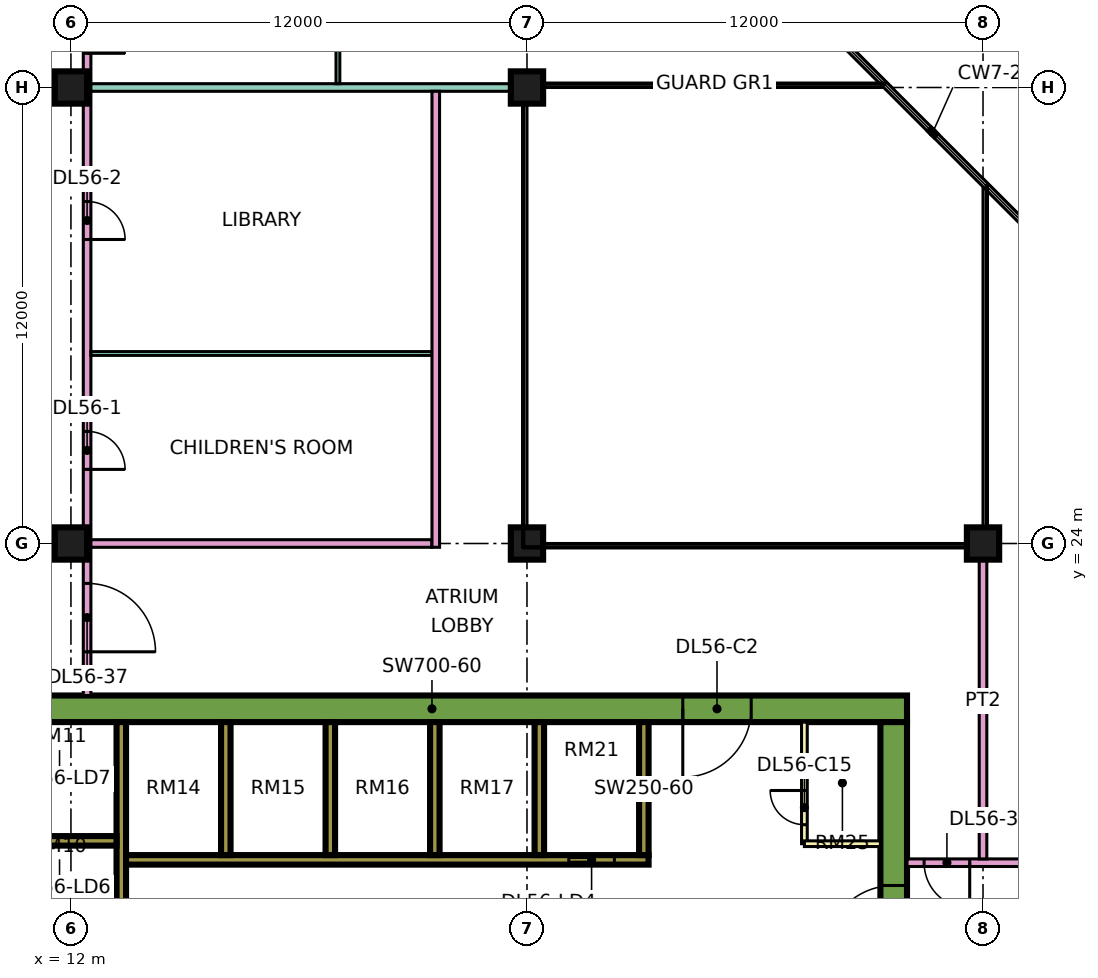
"""IFC4 building model, lengths in metres.
Left out: names, types, materials, properties, quantities, classifications, styles, units other than length and angle.
Written with IfcOpenShell. Run it as: python <this file> out.ifc"""

import sys

from ifc_helpers import new_model, si_unit, direction, frame, frame_2d, origin, origin_2d, place, context, subcontext, project, spatial, rectangle, extrude, element, fill, save


model = new_model("IFC4")
c1 = context("Model", 3, precision=1e-05, world=origin(), true_north=direction((0.0, 1.0)))
c2 = subcontext(c1, "Body", "Model", "MODEL_VIEW")
j1 = project(units=[si_unit("LENGTHUNIT", "METRE"), si_unit("PLANEANGLEUNIT", "RADIAN")], contexts=[c1])
p1 = place(None, origin())
s1 = spatial("IfcSite", under=j1, at=p1, CompositionType="ELEMENT")
p2 = place(p1, origin())
s2 = spatial("IfcBuilding", under=s1, at=p2, CompositionType="ELEMENT")
p3 = place(p2, frame((0.0, 0.0, 237.9)))
s3 = spatial("IfcBuildingStorey", under=s2, at=p3, CompositionType="ELEMENT", Elevation=237.9)
for number, where, z_axis, x_axis in (
    (1, (12.0, 24.0, 0.0), (0.0, 0.0, 1.0), (1.0, 0.0, 0.0)),
    (2, (12.0, 36.0, 0.0), (0.0, 0.0, 1.0), (1.0, 0.0, 0.0)),
    (3, (24.0, 24.0, 0.0), (0.0, 0.0, 1.0), (1.0, 0.0, 0.0)),
    (4, (24.0, 36.0, 0.0), (0.0, 0.0, 1.0), (1.0, 0.0, 0.0)),
    (5, (36.0, 24.0, 0.0), (0.0, 0.0, 1.0), (1.0, 0.0, 0.0)),
):
    element("IfcColumn", number, at=place(p3, frame(where, z_axis=z_axis, x_axis=x_axis)), inside=s3, PredefinedType="COLUMN", context=c2, shape_type="SweptSolid", body=[
        extrude(rectangle(XDim=0.85, YDim=0.85, at=origin_2d()), origin(), (0.0, 0.0, 1.0), 3.75),
    ])
p4 = place(p3, frame((9.0, 19.65, 0.0), z_axis=(0.0, 0.0, 1.0), x_axis=(1.0, 0.0, 0.0)))
e6 = element("IfcWall", 6, at=p4, inside=s3, PredefinedType="SHEAR", context=c2, shape_type="SweptSolid", body=[
    extrude(rectangle(XDim=25.0, YDim=0.7, at=frame_2d((12.5, 0.0))), origin(), (0.0, 0.0, 1.0), 3.75),
])
p5 = place(p4, frame((19.1, 0.0, 0.0)))
e7 = element("IfcOpeningElement", 7, at=p5, cuts=e6, PredefinedType="OPENING", context=c2, shape_type="SweptSolid", body=[
    extrude(rectangle(XDim=1.8, YDim=2.4, at=frame_2d((0.9, 1.2))), frame((0.0, 0.36, 0.0), z_axis=(0.0, -1.0, 0.0), x_axis=(1.0, 0.0, 0.0)), (0.0, 0.0, 1.0), 0.72),
])
p6 = place(p3, frame((33.65, 7.7, 0.0), z_axis=(0.0, 0.0, 1.0), x_axis=(0.0, 1.0, 0.0)))
e8 = element("IfcWall", 8, at=p6, inside=s3, PredefinedType="SHEAR", context=c2, shape_type="SweptSolid", body=[
    extrude(rectangle(XDim=11.6, YDim=0.7, at=frame_2d((5.8, 0.0))), origin(), (0.0, 0.0, 1.0), 3.75),
])
p7 = place(p6, frame((5.5, 0.0, 0.0)))
e9 = element("IfcOpeningElement", 9, at=p7, cuts=e8, PredefinedType="OPENING", context=c2, shape_type="SweptSolid", body=[
    extrude(rectangle(XDim=1.8, YDim=2.4, at=frame_2d((0.9, 1.2))), frame((0.0, 0.36, 0.0), z_axis=(0.0, -1.0, 0.0), x_axis=(1.0, 0.0, 0.0)), (0.0, 0.0, 1.0), 0.72),
])
p8 = place(p3, frame((13.325, 7.7, 0.0), z_axis=(0.0, 0.0, 1.0), x_axis=(0.0, 1.0, 0.0)))
e10 = element("IfcWall", 10, at=p8, inside=s3, PredefinedType="SHEAR", context=c2, shape_type="SweptSolid", body=[
    extrude(rectangle(XDim=11.6, YDim=0.25, at=frame_2d((5.8, 0.0))), origin(), (0.0, 0.0, 1.0), 3.75),
])
p9 = place(p3, frame((13.45, 15.675, 0.0), z_axis=(0.0, 0.0, 1.0), x_axis=(1.0, 0.0, 0.0)))
e11 = element("IfcWall", 11, at=p9, inside=s3, PredefinedType="SHEAR", context=c2, shape_type="SweptSolid", body=[
    extrude(rectangle(XDim=13.75, YDim=0.25, at=frame_2d((6.875, 0.0))), origin(), (0.0, 0.0, 1.0), 3.75),
])
p10 = place(p9, frame((11.65, 0.0, 0.0)))
e12 = element("IfcOpeningElement", 12, at=p10, cuts=e11, PredefinedType="OPENING", context=c2, shape_type="SweptSolid", body=[
    extrude(rectangle(XDim=1.2, YDim=2.2, at=frame_2d((0.6, 1.1))), frame((0.0, 0.135, 0.0), z_axis=(0.0, -1.0, 0.0), x_axis=(1.0, 0.0, 0.0)), (0.0, 0.0, 1.0), 0.27),
])
p11 = place(p3, frame((10.2, 16.175, 0.0), z_axis=(0.0, 0.0, 1.0), x_axis=(1.0, 0.0, 0.0)))
e13 = element("IfcWall", 13, at=p11, inside=s3, PredefinedType="SHEAR", context=c2, shape_type="SweptSolid", body=[
    extrude(rectangle(XDim=3.0, YDim=0.25, at=frame_2d((1.5, 0.0))), origin(), (0.0, 0.0, 1.0), 3.75),
])
for number, where, z_axis, x_axis in (
    (14, (16.075, 15.8, 0.0), (0.0, 0.0, 1.0), (0.0, 1.0, 0.0)),
    (15, (18.825, 15.8, 0.0), (0.0, 0.0, 1.0), (0.0, 1.0, 0.0)),
    (16, (21.575, 15.8, 0.0), (0.0, 0.0, 1.0), (0.0, 1.0, 0.0)),
    (17, (24.325, 15.8, 0.0), (0.0, 0.0, 1.0), (0.0, 1.0, 0.0)),
    (18, (27.075, 15.8, 0.0), (0.0, 0.0, 1.0), (0.0, 1.0, 0.0)),
):
    element("IfcWall", number, at=place(p3, frame(where, z_axis=z_axis, x_axis=x_axis)), inside=s3, PredefinedType="SHEAR", context=c2, shape_type="SweptSolid", body=[
        extrude(rectangle(XDim=3.5, YDim=0.25, at=frame_2d((1.75, 0.0))), origin(), (0.0, 0.0, 1.0), 3.75),
    ])
p12 = place(p3, frame((31.3, 16.1, 0.0), z_axis=(0.0, 0.0, 1.0), x_axis=(0.0, 1.0, 0.0)))
e19 = element("IfcWall", 19, at=p12, inside=s3, PredefinedType="PARTITIONING", context=c2, shape_type="SweptSolid", body=[
    extrude(rectangle(XDim=3.2, YDim=0.15, at=frame_2d((1.6, 0.0))), origin(), (0.0, 0.0, 1.0), 3.35),
])
p13 = place(p12, frame((0.5, 0.0, 0.0)))
e20 = element("IfcOpeningElement", 20, at=p13, cuts=e19, PredefinedType="OPENING", context=c2, shape_type="SweptSolid", body=[
    extrude(rectangle(XDim=0.9, YDim=2.1, at=frame_2d((0.45, 1.05))), frame((0.0, 0.085, 0.0), z_axis=(0.0, -1.0, 0.0), x_axis=(1.0, 0.0, 0.0)), (0.0, 0.0, 1.0), 0.17),
])
p14 = place(p3, frame((31.3, 16.1, 0.0), z_axis=(0.0, 0.0, 1.0), x_axis=(1.0, 0.0, 0.0)))
e21 = element("IfcWall", 21, at=p14, inside=s3, PredefinedType="PARTITIONING", context=c2, shape_type="SweptSolid", body=[
    extrude(rectangle(XDim=2.0, YDim=0.15, at=frame_2d((1.0, 0.0))), origin(), (0.0, 0.0, 1.0), 3.35),
])
p15 = place(p3, frame((12.425, 20.0, 0.0), z_axis=(0.0, 0.0, 1.0), x_axis=(0.0, 1.0, 0.0)))
e22 = element("IfcWall", 22, at=p15, inside=s3, PredefinedType="PARTITIONING", context=c2, shape_type="SweptSolid", body=[
    extrude(rectangle(XDim=43.0, YDim=0.2, at=frame_2d((21.5, 0.0))), origin(), (0.0, 0.0, 1.0), 3.35),
])
p16 = place(p15, frame((5.95, 0.0, 0.0)))
e23 = element("IfcOpeningElement", 23, at=p16, cuts=e22, PredefinedType="OPENING", context=c2, shape_type="SweptSolid", body=[
    extrude(rectangle(XDim=1.0, YDim=2.1, at=frame_2d((0.5, 1.05))), frame((0.0, 0.11, 0.0), z_axis=(0.0, -1.0, 0.0), x_axis=(1.0, 0.0, 0.0)), (0.0, 0.0, 1.0), 0.22),
])
p17 = place(p15, frame((12.0, 0.0, 0.0)))
e24 = element("IfcOpeningElement", 24, at=p17, cuts=e22, PredefinedType="OPENING", context=c2, shape_type="SweptSolid", body=[
    extrude(rectangle(XDim=1.0, YDim=2.1, at=frame_2d((0.5, 1.05))), frame((0.0, 0.11, 0.0), z_axis=(0.0, -1.0, 0.0), x_axis=(1.0, 0.0, 0.0)), (0.0, 0.0, 1.0), 0.22),
])
p18 = place(p15, frame((16.9, 0.0, 0.0)))
e25 = element("IfcOpeningElement", 25, at=p18, cuts=e22, PredefinedType="OPENING", context=c2, shape_type="SweptSolid", body=[
    extrude(rectangle(XDim=1.0, YDim=2.1, at=frame_2d((0.5, 1.05))), frame((0.0, 0.11, 0.0), z_axis=(0.0, -1.0, 0.0), x_axis=(1.0, 0.0, 0.0)), (0.0, 0.0, 1.0), 0.22),
])
p19 = place(p15, frame((41.05, 0.0, 0.0)))
e26 = element("IfcOpeningElement", 26, at=p19, cuts=e22, PredefinedType="OPENING", context=c2, shape_type="SweptSolid", body=[
    extrude(rectangle(XDim=1.0, YDim=2.1, at=frame_2d((0.5, 1.05))), frame((0.0, 0.11, 0.0), z_axis=(0.0, -1.0, 0.0), x_axis=(1.0, 0.0, 0.0)), (0.0, 0.0, 1.0), 0.22),
])
p20 = place(p15, frame((1.15, 0.0, 0.0)))
e27 = element("IfcOpeningElement", 27, at=p20, cuts=e22, PredefinedType="OPENING", context=c2, shape_type="SweptSolid", body=[
    extrude(rectangle(XDim=1.8, YDim=2.1, at=frame_2d((0.9, 1.05))), frame((0.0, 0.11, 0.0), z_axis=(0.0, -1.0, 0.0), x_axis=(1.0, 0.0, 0.0)), (0.0, 0.0, 1.0), 0.22),
])
p21 = place(p15, frame((28.6, 0.0, 0.0)))
e28 = element("IfcOpeningElement", 28, at=p21, cuts=e22, PredefinedType="OPENING", context=c2, shape_type="SweptSolid", body=[
    extrude(rectangle(XDim=1.8, YDim=2.1, at=frame_2d((0.9, 1.05))), frame((0.0, 0.11, 0.0), z_axis=(0.0, -1.0, 0.0), x_axis=(1.0, 0.0, 0.0)), (0.0, 0.0, 1.0), 0.22),
])
p22 = place(p3, frame((12.525, 24.0, 0.0), z_axis=(0.0, 0.0, 1.0), x_axis=(1.0, 0.0, 0.0)))
e29 = element("IfcWall", 29, at=p22, inside=s3, PredefinedType="PARTITIONING", context=c2, shape_type="SweptSolid", body=[
    extrude(rectangle(XDim=8.975, YDim=0.2, at=frame_2d((4.488, 0.0))), origin(), (0.0, 0.0, 1.0), 3.35),
])
p23 = place(p3, frame((12.525, 29.0, 0.0), z_axis=(0.0, 0.0, 1.0), x_axis=(1.0, 0.0, 0.0)))
e30 = element("IfcWall", 30, at=p23, inside=s3, PredefinedType="PARTITIONING", context=c2, shape_type="SweptSolid", body=[
    extrude(rectangle(XDim=8.975, YDim=0.1, at=frame_2d((4.488, 0.0))), origin(), (0.0, 0.0, 1.0), 3.35),
])
p24 = place(p3, frame((12.525, 36.0, 0.0), z_axis=(0.0, 0.0, 1.0), x_axis=(1.0, 0.0, 0.0)))
e31 = element("IfcWall", 31, at=p24, inside=s3, PredefinedType="PARTITIONING", context=c2, shape_type="SweptSolid", body=[
    extrude(rectangle(XDim=11.475, YDim=0.2, at=frame_2d((5.738, 0.0))), origin(), (0.0, 0.0, 1.0), 3.35),
])
p25 = place(p3, frame((19.025, 36.1, 0.0), z_axis=(0.0, 0.0, 1.0), x_axis=(0.0, 1.0, 0.0)))
e32 = element("IfcWall", 32, at=p25, inside=s3, PredefinedType="PARTITIONING", context=c2, shape_type="SweptSolid", body=[
    extrude(rectangle(XDim=5.95, YDim=0.1, at=frame_2d((2.975, 0.0))), origin(), (0.0, 0.0, 1.0), 3.35),
])
p26 = place(p25, frame((0.95, 0.0, 0.0)))
e33 = element("IfcOpeningElement", 33, at=p26, cuts=e32, PredefinedType="OPENING", context=c2, shape_type="SweptSolid", body=[
    extrude(rectangle(XDim=0.9, YDim=2.1, at=frame_2d((0.45, 1.05))), frame((0.0, 0.06, 0.0), z_axis=(0.0, -1.0, 0.0), x_axis=(1.0, 0.0, 0.0)), (0.0, 0.0, 1.0), 0.12),
])
p27 = place(p25, frame((3.95, 0.0, 0.0)))
e34 = element("IfcOpeningElement", 34, at=p27, cuts=e32, PredefinedType="OPENING", context=c2, shape_type="SweptSolid", body=[
    extrude(rectangle(XDim=0.9, YDim=2.1, at=frame_2d((0.45, 1.05))), frame((0.0, 0.06, 0.0), z_axis=(0.0, -1.0, 0.0), x_axis=(1.0, 0.0, 0.0)), (0.0, 0.0, 1.0), 0.12),
])
p28 = place(p3, frame((21.6, 23.9, 0.0), z_axis=(0.0, 0.0, 1.0), x_axis=(0.0, 1.0, 0.0)))
e35 = element("IfcWall", 35, at=p28, inside=s3, PredefinedType="PARTITIONING", context=c2, shape_type="SweptSolid", body=[
    extrude(rectangle(XDim=12.0, YDim=0.2, at=frame_2d((6.0, 0.0))), origin(), (0.0, 0.0, 1.0), 3.35),
])
p29 = place(p3, frame((34.0, 15.6, 0.0), z_axis=(0.0, 0.0, 1.0), x_axis=(1.0, 0.0, 0.0)))
e36 = element("IfcWall", 36, at=p29, inside=s3, PredefinedType="PARTITIONING", context=c2, shape_type="SweptSolid", body=[
    extrude(rectangle(XDim=10.35, YDim=0.2, at=frame_2d((5.175, 0.0))), origin(), (0.0, 0.0, 1.0), 3.35),
])
p30 = place(p29, frame((5.6, 0.0, 0.0)))
e37 = element("IfcOpeningElement", 37, at=p30, cuts=e36, PredefinedType="OPENING", context=c2, shape_type="SweptSolid", body=[
    extrude(rectangle(XDim=1.0, YDim=2.1, at=frame_2d((0.5, 1.05))), frame((0.0, 0.11, 0.0), z_axis=(0.0, -1.0, 0.0), x_axis=(1.0, 0.0, 0.0)), (0.0, 0.0, 1.0), 0.22),
])
p31 = place(p29, frame((0.45, 0.0, 0.0)))
e38 = element("IfcOpeningElement", 38, at=p31, cuts=e36, PredefinedType="OPENING", context=c2, shape_type="SweptSolid", body=[
    extrude(rectangle(XDim=1.2, YDim=2.1, at=frame_2d((0.6, 1.05))), frame((0.0, 0.11, 0.0), z_axis=(0.0, -1.0, 0.0), x_axis=(1.0, 0.0, 0.0)), (0.0, 0.0, 1.0), 0.22),
])
p32 = place(p3, frame((36.0, 15.7, 0.0), z_axis=(0.0, 0.0, 1.0), x_axis=(0.0, 1.0, 0.0)))
e39 = element("IfcWall", 39, at=p32, inside=s3, PredefinedType="PARTITIONING", context=c2, shape_type="SweptSolid", body=[
    extrude(rectangle(XDim=8.3, YDim=0.2, at=frame_2d((4.15, 0.0))), origin(), (0.0, 0.0, 1.0), 3.35),
])
p33 = place(p10, origin())
e40 = element("IfcDoor", 40, at=p33, inside=s3, OperationType="DOUBLE_DOOR_SLIDING", PredefinedType="DOOR", context=c2, shape_type="SweptSolid", body=[
    extrude(rectangle(XDim=1.2, YDim=2.2, at=frame_2d((0.6, 1.1))), frame((0.0, 0.025, 0.0), z_axis=(0.0, -1.0, 0.0), x_axis=(1.0, 0.0, 0.0)), (0.0, 0.0, 1.0), 0.05),
])
fill(e12, e40)
p34 = place(p7, origin())
e41 = element("IfcDoor", 41, at=p34, inside=s3, OperationType="DOUBLE_DOOR_SINGLE_SWING", PredefinedType="DOOR", context=c2, shape_type="SweptSolid", body=[
    extrude(rectangle(XDim=1.8, YDim=2.4, at=frame_2d((0.9, 1.2))), frame((0.0, 0.025, 0.0), z_axis=(0.0, -1.0, 0.0), x_axis=(1.0, 0.0, 0.0)), (0.0, 0.0, 1.0), 0.05),
])
fill(e9, e41)
p35 = place(p5, frame((1.8, 0.0, 0.0), z_axis=(0.0, 0.0, 1.0), x_axis=(-1.0, 0.0, 0.0)))
e42 = element("IfcDoor", 42, at=p35, inside=s3, OperationType="DOUBLE_DOOR_SINGLE_SWING", PredefinedType="DOOR", context=c2, shape_type="SweptSolid", body=[
    extrude(rectangle(XDim=1.8, YDim=2.4, at=frame_2d((0.9, 1.2))), frame((0.0, 0.025, 0.0), z_axis=(0.0, -1.0, 0.0), x_axis=(1.0, 0.0, 0.0)), (0.0, 0.0, 1.0), 0.05),
])
fill(e7, e42)
p36 = place(p13, frame((0.9, 0.0, 0.0), z_axis=(0.0, 0.0, 1.0), x_axis=(-1.0, 0.0, 0.0)))
e43 = element("IfcDoor", 43, at=p36, inside=s3, OperationType="SINGLE_SWING_RIGHT", PredefinedType="DOOR", context=c2, shape_type="SweptSolid", body=[
    extrude(rectangle(XDim=0.9, YDim=2.1, at=frame_2d((0.45, 1.05))), frame((0.0, 0.025, 0.0), z_axis=(0.0, -1.0, 0.0), x_axis=(1.0, 0.0, 0.0)), (0.0, 0.0, 1.0), 0.05),
])
fill(e20, e43)
p37 = place(p16, frame((1.0, 0.0, 0.0), z_axis=(0.0, 0.0, 1.0), x_axis=(-1.0, 0.0, 0.0)))
e44 = element("IfcDoor", 44, at=p37, inside=s3, OperationType="SINGLE_SWING_LEFT", PredefinedType="DOOR", context=c2, shape_type="SweptSolid", body=[
    extrude(rectangle(XDim=1.0, YDim=2.1, at=frame_2d((0.5, 1.05))), frame((0.0, 0.025, 0.0), z_axis=(0.0, -1.0, 0.0), x_axis=(1.0, 0.0, 0.0)), (0.0, 0.0, 1.0), 0.05),
])
fill(e23, e44)
p38 = place(p17, frame((1.0, 0.0, 0.0), z_axis=(0.0, 0.0, 1.0), x_axis=(-1.0, 0.0, 0.0)))
e45 = element("IfcDoor", 45, at=p38, inside=s3, OperationType="SINGLE_SWING_LEFT", PredefinedType="DOOR", context=c2, shape_type="SweptSolid", body=[
    extrude(rectangle(XDim=1.0, YDim=2.1, at=frame_2d((0.5, 1.05))), frame((0.0, 0.025, 0.0), z_axis=(0.0, -1.0, 0.0), x_axis=(1.0, 0.0, 0.0)), (0.0, 0.0, 1.0), 0.05),
])
fill(e24, e45)
p39 = place(p18, frame((1.0, 0.0, 0.0), z_axis=(0.0, 0.0, 1.0), x_axis=(-1.0, 0.0, 0.0)))
e46 = element("IfcDoor", 46, at=p39, inside=s3, OperationType="SINGLE_SWING_LEFT", PredefinedType="DOOR", context=c2, shape_type="SweptSolid", body=[
    extrude(rectangle(XDim=1.0, YDim=2.1, at=frame_2d((0.5, 1.05))), frame((0.0, 0.025, 0.0), z_axis=(0.0, -1.0, 0.0), x_axis=(1.0, 0.0, 0.0)), (0.0, 0.0, 1.0), 0.05),
])
fill(e25, e46)
p40 = place(p31, origin())
e47 = element("IfcDoor", 47, at=p40, inside=s3, OperationType="SINGLE_SWING_RIGHT", PredefinedType="DOOR", context=c2, shape_type="SweptSolid", body=[
    extrude(rectangle(XDim=1.2, YDim=2.1, at=frame_2d((0.6, 1.05))), frame((0.0, 0.025, 0.0), z_axis=(0.0, -1.0, 0.0), x_axis=(1.0, 0.0, 0.0)), (0.0, 0.0, 1.0), 0.05),
])
fill(e38, e47)
p41 = place(p20, frame((1.8, 0.0, 0.0), z_axis=(0.0, 0.0, 1.0), x_axis=(-1.0, 0.0, 0.0)))
e48 = element("IfcDoor", 48, at=p41, inside=s3, OperationType="DOUBLE_DOOR_SINGLE_SWING", PredefinedType="DOOR", context=c2, shape_type="SweptSolid", body=[
    extrude(rectangle(XDim=1.8, YDim=2.1, at=frame_2d((0.9, 1.05))), frame((0.0, 0.025, 0.0), z_axis=(0.0, -1.0, 0.0), x_axis=(1.0, 0.0, 0.0)), (0.0, 0.0, 1.0), 0.05),
])
fill(e27, e48)
save(model, sys.argv[1])
